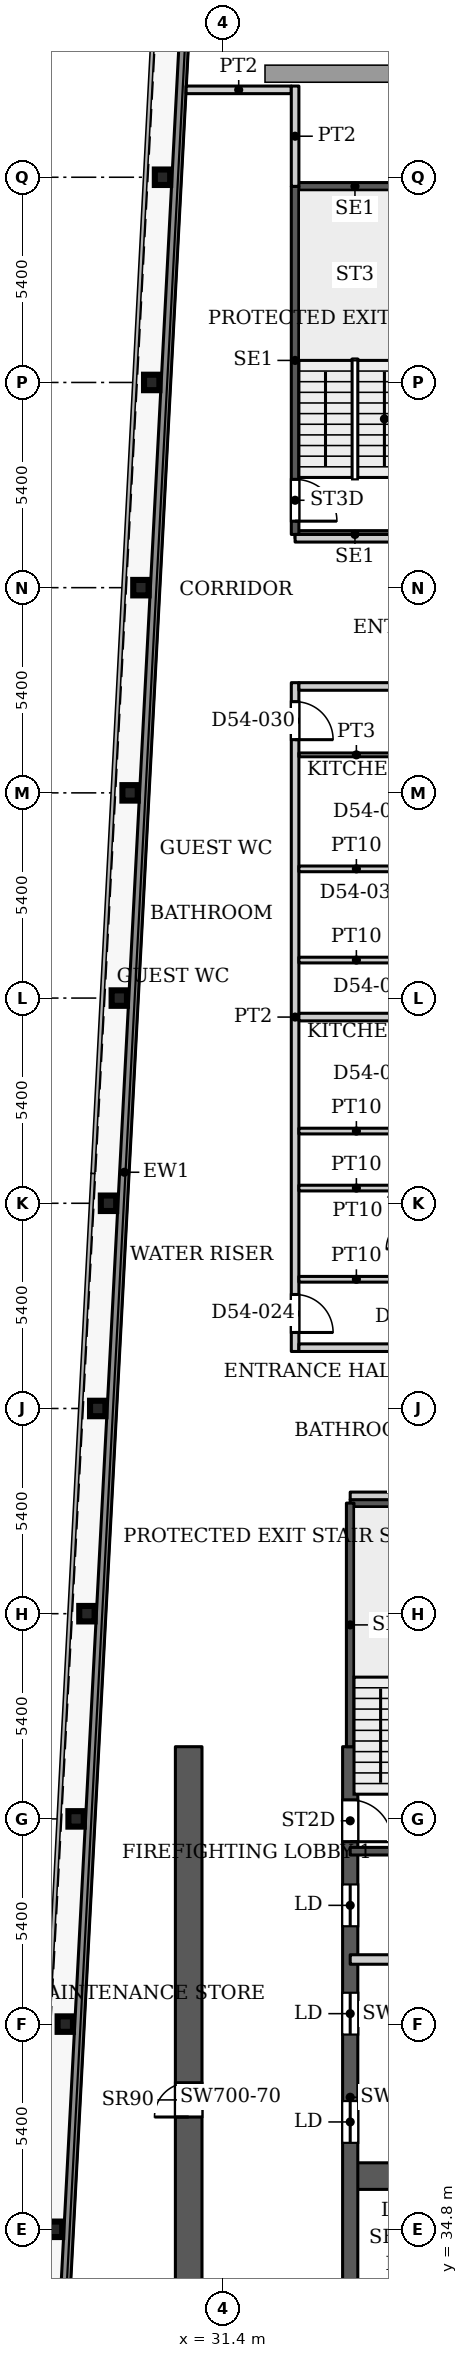
"""IFC4 building model, lengths in metres.
Left out: names, types, materials, properties, quantities, classifications, styles, units other than length and angle.
Written with IfcOpenShell. Run it as: python <this file> out.ifc"""

import sys

from ifc_helpers import new_model, si_unit, direction, frame, frame_2d, origin, origin_2d, place, context, subcontext, project, spatial, rectangle, i_section, extrude, source, transform, mapped, element, fill, save


model = new_model("IFC4")
c1 = context("Model", 3, precision=1e-05, world=origin(), true_north=direction((0.0, 1.0)))
c2 = subcontext(c1, "Body", "Model", "MODEL_VIEW")
j1 = project(units=[si_unit("LENGTHUNIT", "METRE"), si_unit("PLANEANGLEUNIT", "RADIAN")], contexts=[c1])
p1 = place(None, origin())
s1 = spatial("IfcSite", under=j1, at=p1, CompositionType="ELEMENT")
p2 = place(p1, origin())
s2 = spatial("IfcBuilding", under=s1, at=p2, CompositionType="ELEMENT")
p3 = place(p2, frame((0.0, 0.0, 235.7)))
s3 = spatial("IfcBuildingStorey", under=s2, at=p3, CompositionType="ELEMENT", Elevation=235.7)
for number, where, z_axis, x_axis in (
    (1, (26.969, 34.8, 0.0), (0.0, 0.0, 1.0), (1.0, 0.0, 0.0)),
    (2, (27.253, 40.2, 0.0), (0.0, 0.0, 1.0), (1.0, 0.0, 0.0)),
    (3, (27.537, 45.6, 0.0), (0.0, 0.0, 1.0), (1.0, 0.0, 0.0)),
    (4, (27.822, 51.0, 0.0), (0.0, 0.0, 1.0), (1.0, 0.0, 0.0)),
    (5, (28.106, 56.4, 0.0), (0.0, 0.0, 1.0), (1.0, 0.0, 0.0)),
    (6, (28.39, 61.8, 0.0), (0.0, 0.0, 1.0), (1.0, 0.0, 0.0)),
    (7, (28.674, 67.2, 0.0), (0.0, 0.0, 1.0), (1.0, 0.0, 0.0)),
    (8, (28.958, 72.6, 0.0), (0.0, 0.0, 1.0), (1.0, 0.0, 0.0)),
    (9, (29.243, 78.0, 0.0), (0.0, 0.0, 1.0), (1.0, 0.0, 0.0)),
    (10, (29.527, 83.4, 0.0), (0.0, 0.0, 1.0), (1.0, 0.0, 0.0)),
    (11, (29.811, 88.8, 0.0), (0.0, 0.0, 1.0), (1.0, 0.0, 0.0)),
):
    element("IfcColumn", number, at=place(p3, frame(where, z_axis=z_axis, x_axis=x_axis)), inside=s3, PredefinedType="COLUMN", context=c2, shape_type="SweptSolid", body=[
        extrude(i_section(OverallWidth=0.404, OverallDepth=0.407, WebThickness=0.027, FlangeThickness=0.044, FilletRadius=0.012, at=origin_2d()), origin(), (0.0, 0.0, 1.0), 3.9),
    ])
p4 = place(p3, frame((34.75, 36.2, 0.0), z_axis=(0.0, 0.0, 1.0), x_axis=(1.0, 0.0, 0.0)))
e12 = element("IfcWall", 12, at=p4, inside=s3, PredefinedType="SHEAR", context=c2, shape_type="SweptSolid", body=[
    extrude(rectangle(XDim=18.4, YDim=0.7, at=frame_2d((9.2, 0.0))), origin(), (0.0, 0.0, 1.0), 3.9),
])
p5 = place(p4, frame((16.9, 0.0, 0.0)))
e13 = element("IfcOpeningElement", 13, at=p5, cuts=e12, PredefinedType="OPENING", context=c2, shape_type="SweptSolid", body=[
    extrude(rectangle(XDim=1.0, YDim=2.2, at=frame_2d((0.5, 1.1))), frame((0.0, 0.36, 0.0), z_axis=(0.0, -1.0, 0.0), x_axis=(1.0, 0.0, 0.0)), (0.0, 0.0, 1.0), 0.72),
])
p6 = place(p3, frame((34.75, 29.05, 0.0), z_axis=(0.0, 0.0, 1.0), x_axis=(0.0, 1.0, 0.0)))
e14 = element("IfcWall", 14, at=p6, inside=s3, PredefinedType="SHEAR", context=c2, shape_type="SweptSolid", body=[
    extrude(rectangle(XDim=18.45, YDim=0.4, at=frame_2d((9.225, 0.0))), origin(), (0.0, 0.0, 1.0), 3.9),
])
p7 = place(p6, frame((8.025, 0.0, 0.0)))
e15 = element("IfcOpeningElement", 15, at=p7, cuts=e14, PredefinedType="OPENING", context=c2, shape_type="SweptSolid", body=[
    extrude(rectangle(XDim=1.1, YDim=2.2, at=frame_2d((0.55, 1.1))), frame((0.0, 0.21, 0.0), z_axis=(0.0, -1.0, 0.0), x_axis=(1.0, 0.0, 0.0)), (0.0, 0.0, 1.0), 0.42),
])
p8 = place(p6, frame((10.875, 0.0, 0.0)))
e16 = element("IfcOpeningElement", 16, at=p8, cuts=e14, PredefinedType="OPENING", context=c2, shape_type="SweptSolid", body=[
    extrude(rectangle(XDim=1.1, YDim=2.2, at=frame_2d((0.55, 1.1))), frame((0.0, 0.21, 0.0), z_axis=(0.0, -1.0, 0.0), x_axis=(1.0, 0.0, 0.0)), (0.0, 0.0, 1.0), 0.42),
])
p9 = place(p6, frame((13.725, 0.0, 0.0)))
e17 = element("IfcOpeningElement", 17, at=p9, cuts=e14, PredefinedType="OPENING", context=c2, shape_type="SweptSolid", body=[
    extrude(rectangle(XDim=1.1, YDim=2.2, at=frame_2d((0.55, 1.1))), frame((0.0, 0.21, 0.0), z_axis=(0.0, -1.0, 0.0), x_axis=(1.0, 0.0, 0.0)), (0.0, 0.0, 1.0), 0.42),
])
p10 = place(p6, frame((15.95, 0.0, 0.0)))
e18 = element("IfcOpeningElement", 18, at=p10, cuts=e14, PredefinedType="OPENING", context=c2, shape_type="SweptSolid", body=[
    extrude(rectangle(XDim=1.1, YDim=2.2, at=frame_2d((0.55, 1.1))), frame((0.0, 0.21, 0.0), z_axis=(0.0, -1.0, 0.0), x_axis=(1.0, 0.0, 0.0)), (0.0, 0.0, 1.0), 0.42),
])
p11 = place(p3, frame((30.5, 29.05, 0.0), z_axis=(0.0, 0.0, 1.0), x_axis=(0.0, 1.0, 0.0)))
e19 = element("IfcWall", 19, at=p11, inside=s3, PredefinedType="SHEAR", context=c2, shape_type="SweptSolid", body=[
    extrude(rectangle(XDim=18.45, YDim=0.7, at=frame_2d((9.225, 0.0))), origin(), (0.0, 0.0, 1.0), 3.9),
])
p12 = place(p11, frame((1.5, 0.0, 0.0)))
e20 = element("IfcOpeningElement", 20, at=p12, cuts=e19, PredefinedType="OPENING", context=c2, shape_type="SweptSolid", body=[
    extrude(rectangle(XDim=0.9, YDim=2.2, at=frame_2d((0.45, 1.1))), frame((0.0, 0.36, 0.0), z_axis=(0.0, -1.0, 0.0), x_axis=(1.0, 0.0, 0.0)), (0.0, 0.0, 1.0), 0.72),
])
p13 = place(p11, frame((8.705, 0.0, 0.0)))
e21 = element("IfcOpeningElement", 21, at=p13, cuts=e19, PredefinedType="OPENING", context=c2, shape_type="SweptSolid", body=[
    extrude(rectangle(XDim=0.9, YDim=2.2, at=frame_2d((0.45, 1.1))), frame((0.0, 0.36, 0.0), z_axis=(0.0, -1.0, 0.0), x_axis=(1.0, 0.0, 0.0)), (0.0, 0.0, 1.0), 0.72),
])
p14 = place(p3, frame((27.195, 31.969, 0.0), z_axis=(0.0, 0.0, 1.0), x_axis=(0.052555284099, 0.998618016117, 0.0)))
e22 = element("IfcWall", 22, at=p14, inside=s3, PredefinedType="SOLIDWALL", context=c2, shape_type="SweptSolid", body=[
    extrude(rectangle(XDim=61.38, YDim=0.25, at=frame_2d((30.69, 0.0))), origin(), (0.0, 0.0, 1.0), 3.75),
])
for number, where, z_axis, x_axis in (
    (23, (34.75, 44.75, 0.0), (0.0, 0.0, 1.0), (1.0, 0.0, 0.0)),
    (24, (34.75, 53.91, 0.0), (0.0, 0.0, 1.0), (1.0, 0.0, 0.0)),
):
    element("IfcWall", number, at=place(p3, frame(where, z_axis=z_axis, x_axis=x_axis)), inside=s3, PredefinedType="SHEAR", context=c2, shape_type="SweptSolid", body=[
        extrude(rectangle(XDim=3.15, YDim=0.2, at=frame_2d((1.575, 0.0))), origin(), (0.0, 0.0, 1.0), 3.9),
    ])
p15 = place(p3, frame((34.75, 47.5, 0.0), z_axis=(0.0, 0.0, 1.0), x_axis=(0.0, 1.0, 0.0)))
e25 = element("IfcWall", 25, at=p15, inside=s3, PredefinedType="SHEAR", context=c2, shape_type="SweptSolid", body=[
    extrude(rectangle(XDim=6.41, YDim=0.2, at=frame_2d((3.205, 0.0))), origin(), (0.0, 0.0, 1.0), 3.9),
])
for number, where, z_axis, x_axis in (
    (26, (33.3, 79.4, 0.0), (0.0, 0.0, 1.0), (1.0, 0.0, 0.0)),
    (27, (33.3, 88.56, 0.0), (0.0, 0.0, 1.0), (1.0, 0.0, 0.0)),
):
    element("IfcWall", number, at=place(p3, frame(where, z_axis=z_axis, x_axis=x_axis)), inside=s3, PredefinedType="SHEAR", context=c2, shape_type="SweptSolid", body=[
        extrude(rectangle(XDim=3.15, YDim=0.2, at=frame_2d((1.575, 0.0))), origin(), (0.0, 0.0, 1.0), 3.9),
    ])
p16 = place(p3, frame((33.3, 79.4, 0.0), z_axis=(0.0, 0.0, 1.0), x_axis=(0.0, 1.0, 0.0)))
e28 = element("IfcWall", 28, at=p16, inside=s3, PredefinedType="SHEAR", context=c2, shape_type="SweptSolid", body=[
    extrude(rectangle(XDim=9.16, YDim=0.2, at=frame_2d((4.58, 0.0))), origin(), (0.0, 0.0, 1.0), 3.9),
])
p17 = place(p16, frame((0.35, 0.0, 0.0)))
e29 = element("IfcOpeningElement", 29, at=p17, cuts=e28, PredefinedType="OPENING", context=c2, shape_type="SweptSolid", body=[
    extrude(rectangle(XDim=1.1, YDim=2.2, at=frame_2d((0.55, 1.1))), frame((0.0, 0.11, 0.0), z_axis=(0.0, -1.0, 0.0), x_axis=(1.0, 0.0, 0.0)), (0.0, 0.0, 1.0), 0.22),
])
p18 = place(p3, frame((34.75, 41.9, 0.0), z_axis=(0.0, 0.0, 1.0), x_axis=(1.0, 0.0, 0.0)))
e30 = element("IfcWall", 30, at=p18, inside=s3, PredefinedType="PARTITIONING", context=c2, shape_type="SweptSolid", body=[
    extrude(rectangle(XDim=3.25, YDim=0.25, at=frame_2d((1.625, 0.0))), origin(), (0.0, 0.0, 1.0), 3.9),
])
p19 = place(p3, frame((30.432, 91.1, 0.0), z_axis=(0.0, 0.0, 1.0), x_axis=(1.0, 0.0, 0.0)))
e31 = element("IfcWall", 31, at=p19, inside=s3, PredefinedType="PARTITIONING", context=c2, shape_type="SweptSolid", body=[
    extrude(rectangle(XDim=2.768, YDim=0.2, at=frame_2d((1.384, 0.0))), origin(), (0.0, 0.0, 1.0), 3.6),
])
p20 = place(p3, frame((33.3, 57.9, 0.0), z_axis=(0.0, 0.0, 1.0), x_axis=(0.0, 1.0, 0.0)))
e32 = element("IfcWall", 32, at=p20, inside=s3, PredefinedType="PARTITIONING", context=c2, shape_type="SweptSolid", body=[
    extrude(rectangle(XDim=17.6, YDim=0.2, at=frame_2d((8.8, 0.0))), origin(), (0.0, 0.0, 1.0), 3.6),
])
p21 = place(p20, frame((0.5, 0.0, 0.0)))
e33 = element("IfcOpeningElement", 33, at=p21, cuts=e32, PredefinedType="OPENING", context=c2, shape_type="SweptSolid", body=[
    extrude(rectangle(XDim=1.0, YDim=2.1, at=frame_2d((0.5, 1.05))), frame((0.0, 0.11, 0.0), z_axis=(0.0, -1.0, 0.0), x_axis=(1.0, 0.0, 0.0)), (0.0, 0.0, 1.0), 0.22),
])
p22 = place(p20, frame((16.1, 0.0, 0.0)))
e34 = element("IfcOpeningElement", 34, at=p22, cuts=e32, PredefinedType="OPENING", context=c2, shape_type="SweptSolid", body=[
    extrude(rectangle(XDim=1.0, YDim=2.1, at=frame_2d((0.5, 1.05))), frame((0.0, 0.11, 0.0), z_axis=(0.0, -1.0, 0.0), x_axis=(1.0, 0.0, 0.0)), (0.0, 0.0, 1.0), 0.22),
])
p23 = place(p3, frame((33.3, 79.3, 0.0), z_axis=(0.0, 0.0, 1.0), x_axis=(1.0, 0.0, 0.0)))
e35 = element("IfcWall", 35, at=p23, inside=s3, PredefinedType="PARTITIONING", context=c2, shape_type="SweptSolid", body=[
    extrude(rectangle(XDim=12.6, YDim=0.2, at=frame_2d((6.3, 0.0))), origin(), (0.0, 0.0, 1.0), 3.6),
])
p24 = place(p23, frame((5.795, 0.0, 0.0)))
e36 = element("IfcOpeningElement", 36, at=p24, cuts=e35, PredefinedType="OPENING", context=c2, shape_type="SweptSolid", body=[
    extrude(rectangle(XDim=1.0, YDim=2.1, at=frame_2d((0.5, 1.05))), frame((0.0, 0.11, 0.0), z_axis=(0.0, -1.0, 0.0), x_axis=(1.0, 0.0, 0.0)), (0.0, 0.0, 1.0), 0.22),
])
p25 = place(p3, frame((33.3, 88.56, 0.0), z_axis=(0.0, 0.0, 1.0), x_axis=(0.0, 1.0, 0.0)))
e37 = element("IfcWall", 37, at=p25, inside=s3, PredefinedType="PARTITIONING", context=c2, shape_type="SweptSolid", body=[
    extrude(rectangle(XDim=2.64, YDim=0.2, at=frame_2d((1.32, 0.0))), origin(), (0.0, 0.0, 1.0), 3.6),
])
p26 = place(p3, frame((33.4, 58.0, 0.0), z_axis=(0.0, 0.0, 1.0), x_axis=(1.0, 0.0, 0.0)))
e38 = element("IfcWall", 38, at=p26, inside=s3, PredefinedType="PARTITIONING", context=c2, shape_type="SweptSolid", body=[
    extrude(rectangle(XDim=12.5, YDim=0.2, at=frame_2d((6.25, 0.0))), origin(), (0.0, 0.0, 1.0), 3.6),
])
for number, where, z_axis, x_axis in (
    (39, (33.4, 59.8, 0.0), (0.0, 0.0, 1.0), (1.0, 0.0, 0.0)),
    (40, (33.4, 62.2, 0.0), (0.0, 0.0, 1.0), (1.0, 0.0, 0.0)),
    (41, (33.4, 63.7, 0.0), (0.0, 0.0, 1.0), (1.0, 0.0, 0.0)),
):
    element("IfcWall", number, at=place(p3, frame(where, z_axis=z_axis, x_axis=x_axis)), inside=s3, PredefinedType="PARTITIONING", context=c2, shape_type="SweptSolid", body=[
        extrude(rectangle(XDim=3.025, YDim=0.15, at=frame_2d((1.513, 0.0))), origin(), (0.0, 0.0, 1.0), 3.6),
    ])
p27 = place(p3, frame((33.4, 66.7, 0.0), z_axis=(0.0, 0.0, 1.0), x_axis=(1.0, 0.0, 0.0)))
e42 = element("IfcWall", 42, at=p27, inside=s3, PredefinedType="PARTITIONING", context=c2, shape_type="SweptSolid", body=[
    extrude(rectangle(XDim=12.5, YDim=0.2, at=frame_2d((6.25, 0.0))), origin(), (0.0, 0.0, 1.0), 3.6),
])
for number, where, z_axis, x_axis in (
    (43, (33.4, 68.2, 0.0), (0.0, 0.0, 1.0), (1.0, 0.0, 0.0)),
    (44, (33.4, 70.6, 0.0), (0.0, 0.0, 1.0), (1.0, 0.0, 0.0)),
):
    element("IfcWall", number, at=place(p3, frame(where, z_axis=z_axis, x_axis=x_axis)), inside=s3, PredefinedType="PARTITIONING", context=c2, shape_type="SweptSolid", body=[
        extrude(rectangle(XDim=3.025, YDim=0.15, at=frame_2d((1.513, 0.0))), origin(), (0.0, 0.0, 1.0), 3.6),
    ])
p28 = place(p3, frame((33.4, 73.6, 0.0), z_axis=(0.0, 0.0, 1.0), x_axis=(1.0, 0.0, 0.0)))
e45 = element("IfcWall", 45, at=p28, inside=s3, PredefinedType="PARTITIONING", context=c2, shape_type="SweptSolid", body=[
    extrude(rectangle(XDim=3.025, YDim=0.1, at=frame_2d((1.513, 0.0))), origin(), (0.0, 0.0, 1.0), 3.6),
])
p29 = place(p3, frame((33.4, 75.4, 0.0), z_axis=(0.0, 0.0, 1.0), x_axis=(1.0, 0.0, 0.0)))
e46 = element("IfcWall", 46, at=p29, inside=s3, PredefinedType="PARTITIONING", context=c2, shape_type="SweptSolid", body=[
    extrude(rectangle(XDim=12.5, YDim=0.2, at=frame_2d((6.25, 0.0))), origin(), (0.0, 0.0, 1.0), 3.6),
])
p30 = place(p3, frame((34.75, 54.1, 0.0), z_axis=(0.0, 0.0, 1.0), x_axis=(1.0, 0.0, 0.0)))
e47 = element("IfcWall", 47, at=p30, inside=s3, PredefinedType="PARTITIONING", context=c2, shape_type="SweptSolid", body=[
    extrude(rectangle(XDim=11.15, YDim=0.2, at=frame_2d((5.575, 0.0))), origin(), (0.0, 0.0, 1.0), 3.6),
])
p31 = place(p30, frame((5.075, 0.0, 0.0)))
e48 = element("IfcOpeningElement", 48, at=p31, cuts=e47, PredefinedType="OPENING", context=c2, shape_type="SweptSolid", body=[
    extrude(rectangle(XDim=1.0, YDim=2.1, at=frame_2d((0.5, 1.05))), frame((0.0, 0.11, 0.0), z_axis=(0.0, -1.0, 0.0), x_axis=(1.0, 0.0, 0.0)), (0.0, 0.0, 1.0), 0.22),
])
m1 = source(origin(), c2, "Body", "SweptSolid", [
    extrude(rectangle(XDim=1.1, YDim=2.2, at=frame_2d((0.55, 1.1))), frame((0.0, 0.025, 0.0), z_axis=(0.0, -1.0, 0.0), x_axis=(1.0, 0.0, 0.0)), (0.0, 0.0, 1.0), 0.05),
])
p32 = place(p7, origin())
e49 = element("IfcDoor", 49, at=p32, inside=s3, OperationType="SLIDING_TO_LEFT", PredefinedType="DOOR", context=c2, shape_type="MappedRepresentation", body=[
    mapped(m1, transform((0.0, 0.0, 0.0), x_axis=(1.0, 0.0, 0.0), y_axis=(0.0, 1.0, 0.0), z_axis=(0.0, 0.0, 1.0), scale=1.0)),
])
fill(e15, e49)
p33 = place(p8, origin())
e50 = element("IfcDoor", 50, at=p33, inside=s3, OperationType="SLIDING_TO_LEFT", PredefinedType="DOOR", context=c2, shape_type="MappedRepresentation", body=[
    mapped(m1, transform((0.0, 0.0, 0.0), x_axis=(1.0, 0.0, 0.0), y_axis=(0.0, 1.0, 0.0), z_axis=(0.0, 0.0, 1.0), scale=1.0)),
])
fill(e16, e50)
p34 = place(p9, origin())
e51 = element("IfcDoor", 51, at=p34, inside=s3, OperationType="SLIDING_TO_LEFT", PredefinedType="DOOR", context=c2, shape_type="MappedRepresentation", body=[
    mapped(m1, transform((0.0, 0.0, 0.0), x_axis=(1.0, 0.0, 0.0), y_axis=(0.0, 1.0, 0.0), z_axis=(0.0, 0.0, 1.0), scale=1.0)),
])
fill(e17, e51)
m2 = source(origin(), c2, "Body", "SweptSolid", [
    extrude(rectangle(XDim=0.9, YDim=2.2, at=frame_2d((0.45, 1.1))), frame((0.0, 0.025, 0.0), z_axis=(0.0, -1.0, 0.0), x_axis=(1.0, 0.0, 0.0)), (0.0, 0.0, 1.0), 0.05),
])
p35 = place(p13, origin())
e52 = element("IfcDoor", 52, at=p35, inside=s3, OperationType="SINGLE_SWING_LEFT", PredefinedType="DOOR", context=c2, shape_type="MappedRepresentation", body=[
    mapped(m2, transform((0.0, 0.0, 0.0), x_axis=(1.0, 0.0, 0.0), y_axis=(0.0, 1.0, 0.0), z_axis=(0.0, 0.0, 1.0), scale=1.0)),
])
fill(e21, e52)
m3 = source(origin(), c2, "Body", "SweptSolid", [
    extrude(rectangle(XDim=1.1, YDim=2.2, at=frame_2d((0.55, 1.1))), frame((0.0, 0.025, 0.0), z_axis=(0.0, -1.0, 0.0), x_axis=(1.0, 0.0, 0.0)), (0.0, 0.0, 1.0), 0.05),
])
p36 = place(p10, origin())
e53 = element("IfcDoor", 53, at=p36, inside=s3, OperationType="SINGLE_SWING_RIGHT", PredefinedType="DOOR", context=c2, shape_type="MappedRepresentation", body=[
    mapped(m3, transform((0.0, 0.0, 0.0), x_axis=(1.0, 0.0, 0.0), y_axis=(0.0, 1.0, 0.0), z_axis=(0.0, 0.0, 1.0), scale=1.0)),
])
fill(e18, e53)
p37 = place(p17, origin())
e54 = element("IfcDoor", 54, at=p37, inside=s3, OperationType="SINGLE_SWING_RIGHT", PredefinedType="DOOR", context=c2, shape_type="MappedRepresentation", body=[
    mapped(m3, transform((0.0, 0.0, 0.0), x_axis=(1.0, 0.0, 0.0), y_axis=(0.0, 1.0, 0.0), z_axis=(0.0, 0.0, 1.0), scale=1.0)),
])
fill(e29, e54)
m4 = source(origin(), c2, "Body", "SweptSolid", [
    extrude(rectangle(XDim=1.0, YDim=2.1, at=frame_2d((0.5, 1.05))), frame((0.0, 0.025, 0.0), z_axis=(0.0, -1.0, 0.0), x_axis=(1.0, 0.0, 0.0)), (0.0, 0.0, 1.0), 0.05),
])
p38 = place(p21, origin())
e55 = element("IfcDoor", 55, at=p38, inside=s3, OperationType="SINGLE_SWING_RIGHT", PredefinedType="DOOR", context=c2, shape_type="MappedRepresentation", body=[
    mapped(m4, transform((0.0, 0.0, 0.0), x_axis=(1.0, 0.0, 0.0), y_axis=(0.0, 1.0, 0.0), z_axis=(0.0, 0.0, 1.0), scale=1.0)),
])
fill(e33, e55)
p39 = place(p22, origin())
e56 = element("IfcDoor", 56, at=p39, inside=s3, OperationType="SINGLE_SWING_RIGHT", PredefinedType="DOOR", context=c2, shape_type="MappedRepresentation", body=[
    mapped(m4, transform((0.0, 0.0, 0.0), x_axis=(1.0, 0.0, 0.0), y_axis=(0.0, 1.0, 0.0), z_axis=(0.0, 0.0, 1.0), scale=1.0)),
])
fill(e34, e56)
save(model, sys.argv[1])
